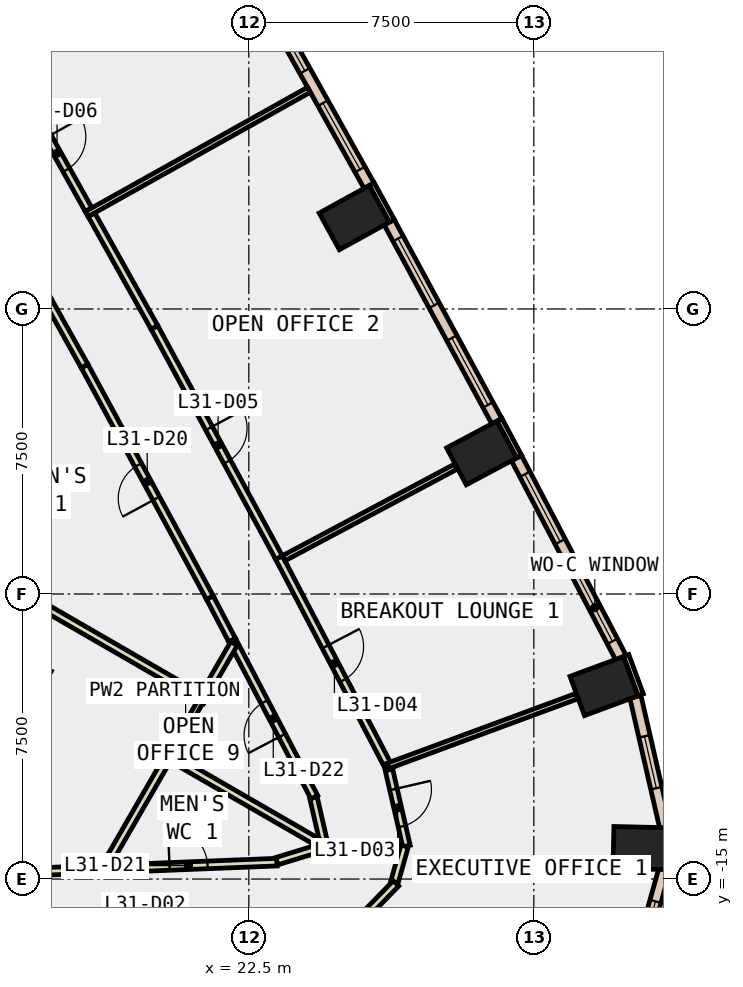
"""IFC4 building model, lengths in metres.
Left out: names, types, materials, properties, quantities, classifications, styles, units other than length and angle.
Written with IfcOpenShell. Run it as: python <this file> out.ifc"""

import sys

from ifc_helpers import new_model, si_unit, direction, frame, frame_2d, origin, origin_2d, place, context, subcontext, project, spatial, rectangle, extrude, element, fill, save


model = new_model("IFC4")
c1 = context("Model", 3, precision=1e-05, world=origin(), true_north=direction((0.0, 1.0)))
c2 = subcontext(c1, "Body", "Model", "MODEL_VIEW")
j1 = project(units=[si_unit("LENGTHUNIT", "METRE"), si_unit("PLANEANGLEUNIT", "RADIAN")], contexts=[c1])
p1 = place(None, origin())
s1 = spatial("IfcSite", under=j1, at=p1, CompositionType="ELEMENT")
p2 = place(p1, origin())
s2 = spatial("IfcBuilding", under=s1, at=p2, CompositionType="ELEMENT")
p3 = place(p2, frame((0.0, 0.0, 142.4)))
s3 = spatial("IfcBuildingStorey", under=s2, at=p3, CompositionType="ELEMENT", Elevation=142.4)
for number, where, z_axis, x_axis in (
    (1, (32.845, -14.185, -0.4), (0.0, 0.0, 1.0), (0.024, 1.0, 0.0)),
    (2, (31.846, -9.923, -0.4), (0.0, 0.0, 1.0), (-0.347, 0.938, 0.0)),
    (3, (28.626, -3.788, -0.4), (0.0, 0.0, 1.0), (-0.47, 0.883, 0.0)),
    (4, (25.275, 2.403, -0.4), (0.0, 0.0, 1.0), (-0.482, 0.876, 0.0)),
):
    element("IfcColumn", number, at=place(p3, frame(where, z_axis=z_axis, x_axis=x_axis)), inside=s3, PredefinedType="COLUMN", context=c2, shape_type="SweptSolid", body=[
        extrude(rectangle(XDim=1.1, YDim=1.5, at=origin_2d()), origin(), (0.0, 0.0, 1.0), 4.2),
    ])
for number, where, z_axis, x_axis in (
    (5, (32.81, -10.153, 0.0), (0.0, 0.0, 1.0), (-0.346, 0.938, 0.0)),
    (6, (29.612, -3.886, 0.0), (0.0, 0.0, 1.0), (-0.47, 0.883, 0.0)),
    (7, (26.263, 2.319, 0.0), (0.0, 0.0, 1.0), (-0.482, 0.876, 0.0)),
):
    element("IfcWall", number, at=place(p3, frame(where, z_axis=z_axis, x_axis=x_axis)), inside=s3, PredefinedType="STANDARD", context=c2, shape_type="SweptSolid", body=[
        extrude(rectangle(XDim=1.1, YDim=0.15, at=frame_2d((0.55, 0.0))), origin(), (0.0, 0.0, 1.0), 3.8),
    ])
p4 = place(p3, frame((32.587, -17.775, 0.0), z_axis=(0.0, 0.0, 1.0), x_axis=(0.270471130801, 0.962728085912, 0.0)))
e8 = element("IfcWall", 8, at=p4, inside=s3, PredefinedType="STANDARD", context=c2, shape_type="SweptSolid", body=[
    extrude(rectangle(XDim=3.143, YDim=0.3, at=frame_2d((1.572, 0.0))), origin(), (0.0, 0.0, 1.0), 3.8),
])
p5 = place(p4, frame((0.872, 0.0, 0.9)))
e9 = element("IfcOpeningElement", 9, at=p5, cuts=e8, PredefinedType="OPENING", context=c2, shape_type="SweptSolid", body=[
    extrude(rectangle(XDim=1.4, YDim=2.6, at=frame_2d((0.7, 1.3))), frame((0.0, 0.16, 0.0), z_axis=(0.0, -1.0, 0.0), x_axis=(1.0, 0.0, 0.0)), (0.0, 0.0, 1.0), 0.32),
])
p6 = place(p3, frame((33.463, -13.651, 0.0), z_axis=(0.0, 0.0, 1.0), x_axis=(-0.223538714932, 0.974695051247, 0.0)))
e10 = element("IfcWall", 10, at=p6, inside=s3, PredefinedType="STANDARD", context=c2, shape_type="SweptSolid", body=[
    extrude(rectangle(XDim=3.538, YDim=0.3, at=frame_2d((1.769, 0.0))), origin(), (0.0, 0.0, 1.0), 3.8),
])
p7 = place(p6, frame((1.069, 0.0, 0.9)))
e11 = element("IfcOpeningElement", 11, at=p7, cuts=e10, PredefinedType="OPENING", context=c2, shape_type="SweptSolid", body=[
    extrude(rectangle(XDim=1.4, YDim=2.6, at=frame_2d((0.7, 1.3))), frame((0.0, 0.16, 0.0), z_axis=(0.0, -1.0, 0.0), x_axis=(1.0, 0.0, 0.0)), (0.0, 0.0, 1.0), 0.32),
])
p8 = place(p3, frame((32.291, -9.173, 0.0), z_axis=(0.0, 0.0, 1.0), x_axis=(-0.463809970306, 0.885934710599, 0.0)))
e12 = element("IfcWall", 12, at=p8, inside=s3, PredefinedType="STANDARD", context=c2, shape_type="SweptSolid", body=[
    extrude(rectangle(XDim=5.927, YDim=0.3, at=frame_2d((2.963, 0.0))), origin(), (0.0, 0.0, 1.0), 3.8),
])
p9 = place(p8, frame((0.482, 0.0, 0.9)))
e13 = element("IfcOpeningElement", 13, at=p9, cuts=e12, PredefinedType="OPENING", context=c2, shape_type="SweptSolid", body=[
    extrude(rectangle(XDim=2.0, YDim=2.6, at=frame_2d((1.0, 1.3))), frame((0.0, 0.16, 0.0), z_axis=(0.0, -1.0, 0.0), x_axis=(1.0, 0.0, 0.0)), (0.0, 0.0, 1.0), 0.32),
])
p10 = place(p8, frame((3.445, 0.0, 0.9)))
e14 = element("IfcOpeningElement", 14, at=p10, cuts=e12, PredefinedType="OPENING", context=c2, shape_type="SweptSolid", body=[
    extrude(rectangle(XDim=2.0, YDim=2.6, at=frame_2d((1.0, 1.3))), frame((0.0, 0.16, 0.0), z_axis=(0.0, -1.0, 0.0), x_axis=(1.0, 0.0, 0.0)), (0.0, 0.0, 1.0), 0.32),
])
p11 = place(p3, frame((29.026, -2.953, 0.0), z_axis=(0.0, 0.0, 1.0), x_axis=(-0.475794135288, 0.87955667289, 0.0)))
e15 = element("IfcWall", 15, at=p11, inside=s3, PredefinedType="STANDARD", context=c2, shape_type="SweptSolid", body=[
    extrude(rectangle(XDim=5.952, YDim=0.3, at=frame_2d((2.976, 0.0))), origin(), (0.0, 0.0, 1.0), 3.8),
])
p12 = place(p11, frame((0.488, 0.0, 0.9)))
e16 = element("IfcOpeningElement", 16, at=p12, cuts=e15, PredefinedType="OPENING", context=c2, shape_type="SweptSolid", body=[
    extrude(rectangle(XDim=2.0, YDim=2.6, at=frame_2d((1.0, 1.3))), frame((0.0, 0.16, 0.0), z_axis=(0.0, -1.0, 0.0), x_axis=(1.0, 0.0, 0.0)), (0.0, 0.0, 1.0), 0.32),
])
p13 = place(p11, frame((3.464, 0.0, 0.9)))
e17 = element("IfcOpeningElement", 17, at=p13, cuts=e15, PredefinedType="OPENING", context=c2, shape_type="SweptSolid", body=[
    extrude(rectangle(XDim=2.0, YDim=2.6, at=frame_2d((1.0, 1.3))), frame((0.0, 0.16, 0.0), z_axis=(0.0, -1.0, 0.0), x_axis=(1.0, 0.0, 0.0)), (0.0, 0.0, 1.0), 0.32),
])
p14 = place(p3, frame((25.665, 3.244, 0.0), z_axis=(0.0, 0.0, 1.0), x_axis=(-0.488009846284, 0.872838123555, 0.0)))
e18 = element("IfcWall", 18, at=p14, inside=s3, PredefinedType="STANDARD", context=c2, shape_type="SweptSolid", body=[
    extrude(rectangle(XDim=5.951, YDim=0.3, at=frame_2d((2.976, 0.0))), origin(), (0.0, 0.0, 1.0), 3.8),
])
p15 = place(p14, frame((0.488, 0.0, 0.9)))
e19 = element("IfcOpeningElement", 19, at=p15, cuts=e18, PredefinedType="OPENING", context=c2, shape_type="SweptSolid", body=[
    extrude(rectangle(XDim=2.0, YDim=2.6, at=frame_2d((1.0, 1.3))), frame((0.0, 0.16, 0.0), z_axis=(0.0, -1.0, 0.0), x_axis=(1.0, 0.0, 0.0)), (0.0, 0.0, 1.0), 0.32),
])
p16 = place(p14, frame((3.463, 0.0, 0.9)))
e20 = element("IfcOpeningElement", 20, at=p16, cuts=e18, PredefinedType="OPENING", context=c2, shape_type="SweptSolid", body=[
    extrude(rectangle(XDim=2.0, YDim=2.6, at=frame_2d((1.0, 1.3))), frame((0.0, 0.16, 0.0), z_axis=(0.0, -1.0, 0.0), x_axis=(1.0, 0.0, 0.0)), (0.0, 0.0, 1.0), 0.32),
])
p17 = place(p3, frame((15.948, -14.846, 0.0), z_axis=(0.0, 0.0, 1.0), x_axis=(0.999208477774, 0.039779617206, 0.0)))
e21 = element("IfcWall", 21, at=p17, inside=s3, PredefinedType="PARTITIONING", context=c2, shape_type="SweptSolid", body=[
    extrude(rectangle(XDim=2.639, YDim=0.2, at=frame_2d((1.32, 0.0))), origin(), (0.0, 0.0, 1.0), 3.8),
])
p18 = place(p3, frame((22.063, -8.717, 0.0), z_axis=(0.0, 0.0, 1.0), x_axis=(-0.463776683525, 0.885952136302, 0.0)))
e22 = element("IfcWall", 22, at=p18, inside=s3, PredefinedType="PARTITIONING", context=c2, shape_type="SweptSolid", body=[
    extrude(rectangle(XDim=1.268, YDim=0.2, at=frame_2d((0.634, 0.0))), origin(), (0.0, 0.0, 1.0), 3.8),
])
p19 = place(p3, frame((21.475, -7.594, 0.0), z_axis=(0.0, 0.0, 1.0), x_axis=(-0.475918691018, 0.879489283357, 0.0)))
e23 = element("IfcWall", 23, at=p19, inside=s3, PredefinedType="PARTITIONING", context=c2, shape_type="SweptSolid", body=[
    extrude(rectangle(XDim=6.928, YDim=0.2, at=frame_2d((3.464, 0.0))), origin(), (0.0, 0.0, 1.0), 3.8),
])
p20 = place(p19, frame((2.964, 0.0, 0.0)))
e24 = element("IfcOpeningElement", 24, at=p20, cuts=e23, PredefinedType="OPENING", context=c2, shape_type="SweptSolid", body=[
    extrude(rectangle(XDim=1.0, YDim=2.1, at=frame_2d((0.5, 1.05))), frame((0.0, 0.11, 0.0), z_axis=(0.0, -1.0, 0.0), x_axis=(1.0, 0.0, 0.0)), (0.0, 0.0, 1.0), 0.22),
])
p21 = place(p3, frame((18.178, -1.501, 0.0), z_axis=(0.0, 0.0, 1.0), x_axis=(-0.487980809747, 0.872854357449, 0.0)))
e25 = element("IfcWall", 25, at=p21, inside=s3, PredefinedType="PARTITIONING", context=c2, shape_type="SweptSolid", body=[
    extrude(rectangle(XDim=2.162, YDim=0.2, at=frame_2d((1.081, 0.0))), origin(), (0.0, 0.0, 1.0), 3.8),
])
p22 = place(p3, frame((18.585, -14.741, 0.0), z_axis=(0.0, 0.0, 1.0), x_axis=(0.99920304932, 0.039915739113, 0.0)))
e26 = element("IfcWall", 26, at=p22, inside=s3, PredefinedType="PARTITIONING", context=c2, shape_type="SweptSolid", body=[
    extrude(rectangle(XDim=4.661, YDim=0.2, at=frame_2d((2.33, 0.0))), origin(), (0.0, 0.0, 1.0), 3.8),
])
p23 = place(p22, frame((1.83, 0.0, 0.0)))
e27 = element("IfcOpeningElement", 27, at=p23, cuts=e26, PredefinedType="OPENING", context=c2, shape_type="SweptSolid", body=[
    extrude(rectangle(XDim=1.0, YDim=2.1, at=frame_2d((0.5, 1.05))), frame((0.0, 0.11, 0.0), z_axis=(0.0, -1.0, 0.0), x_axis=(1.0, 0.0, 0.0)), (0.0, 0.0, 1.0), 0.22),
])
p24 = place(p3, frame((23.238, -14.529, 0.0), z_axis=(0.0, 0.0, 1.0), x_axis=(0.956086269468, 0.293085389152, 0.0)))
e28 = element("IfcWall", 28, at=p24, inside=s3, PredefinedType="PARTITIONING", context=c2, shape_type="SweptSolid", body=[
    extrude(rectangle(XDim=1.252, YDim=0.2, at=frame_2d((0.626, 0.0))), origin(), (0.0, 0.0, 1.0), 3.8),
])
p25 = place(p3, frame((24.482, -14.081, 0.0), z_axis=(0.0, 0.0, 1.0), x_axis=(-0.223967203961, 0.974596681479, 0.0)))
e29 = element("IfcWall", 29, at=p25, inside=s3, PredefinedType="PARTITIONING", context=c2, shape_type="SweptSolid", body=[
    extrude(rectangle(XDim=1.259, YDim=0.2, at=frame_2d((0.629, 0.0))), origin(), (0.0, 0.0, 1.0), 3.8),
])
p26 = place(p3, frame((24.224, -12.845, 0.0), z_axis=(0.0, 0.0, 1.0), x_axis=(-0.463819025987, 0.885929969655, 0.0)))
e30 = element("IfcWall", 30, at=p26, inside=s3, PredefinedType="PARTITIONING", context=c2, shape_type="SweptSolid", body=[
    extrude(rectangle(XDim=4.659, YDim=0.2, at=frame_2d((2.33, 0.0))), origin(), (0.0, 0.0, 1.0), 3.8),
])
p27 = place(p26, frame((1.83, 0.0, 0.0)))
e31 = element("IfcOpeningElement", 31, at=p27, cuts=e30, PredefinedType="OPENING", context=c2, shape_type="SweptSolid", body=[
    extrude(rectangle(XDim=1.0, YDim=2.1, at=frame_2d((0.5, 1.05))), frame((0.0, 0.11, 0.0), z_axis=(0.0, -1.0, 0.0), x_axis=(1.0, 0.0, 0.0)), (0.0, 0.0, 1.0), 0.22),
])
p28 = place(p3, frame((26.186, -12.12, 0.0), z_axis=(0.0, 0.0, 1.0), x_axis=(0.224108401048, -0.974564222912, 0.0)))
e32 = element("IfcWall", 32, at=p28, inside=s3, PredefinedType="PARTITIONING", context=c2, shape_type="SweptSolid", body=[
    extrude(rectangle(XDim=2.065, YDim=0.2, at=frame_2d((1.033, 0.0))), origin(), (0.0, 0.0, 1.0), 3.8),
])
p29 = place(p28, frame((0.533, 0.0, 0.0)))
e33 = element("IfcOpeningElement", 33, at=p29, cuts=e32, PredefinedType="OPENING", context=c2, shape_type="SweptSolid", body=[
    extrude(rectangle(XDim=1.0, YDim=2.1, at=frame_2d((0.5, 1.05))), frame((0.0, 0.11, 0.0), z_axis=(0.0, -1.0, 0.0), x_axis=(1.0, 0.0, 0.0)), (0.0, 0.0, 1.0), 0.22),
])
p30 = place(p3, frame((26.599, -14.132, 0.0), z_axis=(0.0, 0.0, 1.0), x_axis=(-0.270631784819, -0.962682936925, 0.0)))
e34 = element("IfcWall", 34, at=p30, inside=s3, PredefinedType="PARTITIONING", context=c2, shape_type="SweptSolid", body=[
    extrude(rectangle(XDim=0.994, YDim=0.2, at=frame_2d((0.497, 0.0))), origin(), (0.0, 0.0, 1.0), 3.8),
])
p31 = place(p3, frame((26.373, -15.114, 0.0), z_axis=(0.0, 0.0, 1.0), x_axis=(-0.698272822523, -0.715831729756, 0.0)))
e35 = element("IfcWall", 35, at=p31, inside=s3, PredefinedType="PARTITIONING", context=c2, shape_type="SweptSolid", body=[
    extrude(rectangle(XDim=1.196, YDim=0.2, at=frame_2d((0.598, 0.0))), origin(), (0.0, 0.0, 1.0), 3.8),
])
p32 = place(p3, frame((23.294, -6.541, 0.0), z_axis=(0.0, 0.0, 1.0), x_axis=(0.463802391881, -0.885938678062, 0.0)))
e36 = element("IfcWall", 36, at=p32, inside=s3, PredefinedType="PARTITIONING", context=c2, shape_type="SweptSolid", body=[
    extrude(rectangle(XDim=6.287, YDim=0.2, at=frame_2d((3.144, 0.0))), origin(), (0.0, 0.0, 1.0), 3.8),
])
p33 = place(p32, frame((2.644, 0.0, 0.0)))
e37 = element("IfcOpeningElement", 37, at=p33, cuts=e36, PredefinedType="OPENING", context=c2, shape_type="SweptSolid", body=[
    extrude(rectangle(XDim=1.0, YDim=2.1, at=frame_2d((0.5, 1.05))), frame((0.0, 0.11, 0.0), z_axis=(0.0, -1.0, 0.0), x_axis=(1.0, 0.0, 0.0)), (0.0, 0.0, 1.0), 0.22),
])
p34 = place(p3, frame((18.358, 2.481, 0.0), z_axis=(0.0, 0.0, 1.0), x_axis=(0.48792588674, -0.872885060617, 0.0)))
e38 = element("IfcWall", 38, at=p34, inside=s3, PredefinedType="PARTITIONING", context=c2, shape_type="SweptSolid", body=[
    extrude(rectangle(XDim=3.403, YDim=0.2, at=frame_2d((1.701, 0.0))), origin(), (0.0, 0.0, 1.0), 3.8),
])
p35 = place(p3, frame((20.018, -0.489, 0.0), z_axis=(0.0, 0.0, 1.0), x_axis=(0.476025981828, -0.87943121654, 0.0)))
e39 = element("IfcWall", 39, at=p35, inside=s3, PredefinedType="PARTITIONING", context=c2, shape_type="SweptSolid", body=[
    extrude(rectangle(XDim=6.882, YDim=0.2, at=frame_2d((3.441, 0.0))), origin(), (0.0, 0.0, 1.0), 3.8),
])
p36 = place(p35, frame((3.016, 0.0, 0.0)))
e40 = element("IfcOpeningElement", 40, at=p36, cuts=e39, PredefinedType="OPENING", context=c2, shape_type="SweptSolid", body=[
    extrude(rectangle(XDim=1.0, YDim=2.1, at=frame_2d((0.5, 1.05))), frame((0.0, 0.11, 0.0), z_axis=(0.0, -1.0, 0.0), x_axis=(1.0, 0.0, 0.0)), (0.0, 0.0, 1.0), 0.22),
])
p37 = place(p3, frame((16.624, 5.582, 0.0), z_axis=(0.0, 0.0, 1.0), x_axis=(0.487871212611, -0.872915620152, 0.0)))
e41 = element("IfcWall", 41, at=p37, inside=s3, PredefinedType="PARTITIONING", context=c2, shape_type="SweptSolid", body=[
    extrude(rectangle(XDim=3.402, YDim=0.2, at=frame_2d((1.701, 0.0))), origin(), (0.0, 0.0, 1.0), 3.8),
])
p38 = place(p37, frame((1.202, 0.0, 0.0)))
e42 = element("IfcOpeningElement", 42, at=p38, cuts=e41, PredefinedType="OPENING", context=c2, shape_type="SweptSolid", body=[
    extrude(rectangle(XDim=1.0, YDim=2.1, at=frame_2d((0.5, 1.05))), frame((0.0, 0.11, 0.0), z_axis=(0.0, -1.0, 0.0), x_axis=(1.0, 0.0, 0.0)), (0.0, 0.0, 1.0), 0.22),
])
p39 = place(p3, frame((13.485, -5.744, 0.0), z_axis=(0.0, 0.0, 1.0), x_axis=(0.865950545648, -0.500129635687, 0.0)))
e43 = element("IfcWall", 43, at=p39, inside=s3, PredefinedType="PARTITIONING", context=c2, shape_type="SweptSolid", body=[
    extrude(rectangle(XDim=9.1, YDim=0.2, at=frame_2d((4.55, 0.0))), origin(), (0.0, 0.0, 1.0), 3.8),
])
p40 = place(p3, frame((20.347, -11.858, 0.0), z_axis=(0.0, 0.0, 1.0), x_axis=(-0.49990681678, -0.866079196458, 0.0)))
e44 = element("IfcWall", 44, at=p40, inside=s3, PredefinedType="PARTITIONING", context=c2, shape_type="SweptSolid", body=[
    extrude(rectangle(XDim=3.324, YDim=0.2, at=frame_2d((1.662, 0.0))), origin(), (0.0, 0.0, 1.0), 3.8),
])
p41 = place(p3, frame((21.228, -10.331, 0.0), z_axis=(0.0, 0.0, 1.0), x_axis=(-0.499920861661, -0.866071089505, 0.0)))
e45 = element("IfcWall", 45, at=p41, inside=s3, PredefinedType="PARTITIONING", context=c2, shape_type="SweptSolid", body=[
    extrude(rectangle(XDim=1.562, YDim=0.15, at=frame_2d((0.781, 0.0))), origin(), (0.0, 0.0, 1.0), 3.8),
])
p42 = place(p3, frame((22.109, -8.805, 0.0), z_axis=(0.0, 0.0, 1.0), x_axis=(-0.499920861661, -0.866071089505, 0.0)))
e46 = element("IfcWall", 46, at=p42, inside=s3, PredefinedType="PARTITIONING", context=c2, shape_type="SweptSolid", body=[
    extrude(rectangle(XDim=1.562, YDim=0.2, at=frame_2d((0.781, 0.0))), origin(), (0.0, 0.0, 1.0), 3.8),
])
p43 = place(p3, frame((20.31, -11.721, 0.0), z_axis=(0.0, 0.0, 1.0), x_axis=(0.86603399059, -0.499985126921, 0.0)))
e47 = element("IfcWall", 47, at=p43, inside=s3, PredefinedType="PARTITIONING", context=c2, shape_type="SweptSolid", body=[
    extrude(rectangle(XDim=4.854, YDim=0.2, at=frame_2d((2.427, 0.0))), origin(), (0.0, 0.0, 1.0), 3.8),
])
p44 = place(p3, frame((26.164, -12.023, 0.0), z_axis=(0.0, 0.0, 1.0), x_axis=(0.937995804261, 0.346646608505, 0.0)))
e48 = element("IfcWall", 48, at=p44, inside=s3, PredefinedType="PARTITIONING", context=c2, shape_type="SweptSolid", body=[
    extrude(rectangle(XDim=5.288, YDim=0.15, at=frame_2d((2.644, 0.0))), origin(), (0.0, 0.0, 1.0), 3.8),
])
p45 = place(p3, frame((23.417, -6.56, 0.0), z_axis=(0.0, 0.0, 1.0), x_axis=(0.882784638588, 0.469777906967, 0.0)))
e49 = element("IfcWall", 49, at=p45, inside=s3, PredefinedType="PARTITIONING", context=c2, shape_type="SweptSolid", body=[
    extrude(rectangle(XDim=5.13, YDim=0.15, at=frame_2d((2.565, 0.0))), origin(), (0.0, 0.0, 1.0), 3.8),
])
p46 = place(p3, frame((18.234, 2.497, 0.0), z_axis=(0.0, 0.0, 1.0), x_axis=(0.872820235044, 0.4880418397, 0.0)))
e50 = element("IfcWall", 50, at=p46, inside=s3, PredefinedType="PARTITIONING", context=c2, shape_type="SweptSolid", body=[
    extrude(rectangle(XDim=6.7, YDim=0.15, at=frame_2d((3.35, 0.0))), origin(), (0.0, 0.0, 1.0), 3.8),
])
p47 = place(p5, origin())
e51 = element("IfcWindow", 51, at=p47, inside=s3, PartitioningType="SINGLE_PANEL", PredefinedType="WINDOW", context=c2, shape_type="SweptSolid", body=[
    extrude(rectangle(XDim=1.4, YDim=2.6, at=frame_2d((0.7, 1.3))), frame((0.0, 0.03, 0.0), z_axis=(0.0, -1.0, 0.0), x_axis=(1.0, 0.0, 0.0)), (0.0, 0.0, 1.0), 0.06),
])
fill(e9, e51)
p48 = place(p7, origin())
e52 = element("IfcWindow", 52, at=p48, inside=s3, PartitioningType="SINGLE_PANEL", PredefinedType="WINDOW", context=c2, shape_type="SweptSolid", body=[
    extrude(rectangle(XDim=1.4, YDim=2.6, at=frame_2d((0.7, 1.3))), frame((0.0, 0.03, 0.0), z_axis=(0.0, -1.0, 0.0), x_axis=(1.0, 0.0, 0.0)), (0.0, 0.0, 1.0), 0.06),
])
fill(e11, e52)
p49 = place(p9, origin())
e53 = element("IfcWindow", 53, at=p49, inside=s3, PartitioningType="SINGLE_PANEL", PredefinedType="WINDOW", context=c2, shape_type="SweptSolid", body=[
    extrude(rectangle(XDim=2.0, YDim=2.6, at=frame_2d((1.0, 1.3))), frame((0.0, 0.03, 0.0), z_axis=(0.0, -1.0, 0.0), x_axis=(1.0, 0.0, 0.0)), (0.0, 0.0, 1.0), 0.06),
])
fill(e13, e53)
p50 = place(p10, origin())
e54 = element("IfcWindow", 54, at=p50, inside=s3, PartitioningType="SINGLE_PANEL", PredefinedType="WINDOW", context=c2, shape_type="SweptSolid", body=[
    extrude(rectangle(XDim=2.0, YDim=2.6, at=frame_2d((1.0, 1.3))), frame((0.0, 0.03, 0.0), z_axis=(0.0, -1.0, 0.0), x_axis=(1.0, 0.0, 0.0)), (0.0, 0.0, 1.0), 0.06),
])
fill(e14, e54)
p51 = place(p12, origin())
e55 = element("IfcWindow", 55, at=p51, inside=s3, PartitioningType="SINGLE_PANEL", PredefinedType="WINDOW", context=c2, shape_type="SweptSolid", body=[
    extrude(rectangle(XDim=2.0, YDim=2.6, at=frame_2d((1.0, 1.3))), frame((0.0, 0.03, 0.0), z_axis=(0.0, -1.0, 0.0), x_axis=(1.0, 0.0, 0.0)), (0.0, 0.0, 1.0), 0.06),
])
fill(e16, e55)
p52 = place(p13, origin())
e56 = element("IfcWindow", 56, at=p52, inside=s3, PartitioningType="SINGLE_PANEL", PredefinedType="WINDOW", context=c2, shape_type="SweptSolid", body=[
    extrude(rectangle(XDim=2.0, YDim=2.6, at=frame_2d((1.0, 1.3))), frame((0.0, 0.03, 0.0), z_axis=(0.0, -1.0, 0.0), x_axis=(1.0, 0.0, 0.0)), (0.0, 0.0, 1.0), 0.06),
])
fill(e17, e56)
p53 = place(p15, origin())
e57 = element("IfcWindow", 57, at=p53, inside=s3, PartitioningType="SINGLE_PANEL", PredefinedType="WINDOW", context=c2, shape_type="SweptSolid", body=[
    extrude(rectangle(XDim=2.0, YDim=2.6, at=frame_2d((1.0, 1.3))), frame((0.0, 0.03, 0.0), z_axis=(0.0, -1.0, 0.0), x_axis=(1.0, 0.0, 0.0)), (0.0, 0.0, 1.0), 0.06),
])
fill(e19, e57)
p54 = place(p16, origin())
e58 = element("IfcWindow", 58, at=p54, inside=s3, PartitioningType="SINGLE_PANEL", PredefinedType="WINDOW", context=c2, shape_type="SweptSolid", body=[
    extrude(rectangle(XDim=2.0, YDim=2.6, at=frame_2d((1.0, 1.3))), frame((0.0, 0.03, 0.0), z_axis=(0.0, -1.0, 0.0), x_axis=(1.0, 0.0, 0.0)), (0.0, 0.0, 1.0), 0.06),
])
fill(e20, e58)
p55 = place(p29, origin())
e59 = element("IfcDoor", 59, at=p55, inside=s3, OperationType="SINGLE_SWING_LEFT", PredefinedType="DOOR", context=c2, shape_type="SweptSolid", body=[
    extrude(rectangle(XDim=1.0, YDim=2.1, at=frame_2d((0.5, 1.05))), frame((0.0, 0.025, 0.0), z_axis=(0.0, -1.0, 0.0), x_axis=(1.0, 0.0, 0.0)), (0.0, 0.0, 1.0), 0.05),
])
fill(e33, e59)
p56 = place(p33, origin())
e60 = element("IfcDoor", 60, at=p56, inside=s3, OperationType="SINGLE_SWING_LEFT", PredefinedType="DOOR", context=c2, shape_type="SweptSolid", body=[
    extrude(rectangle(XDim=1.0, YDim=2.1, at=frame_2d((0.5, 1.05))), frame((0.0, 0.025, 0.0), z_axis=(0.0, -1.0, 0.0), x_axis=(1.0, 0.0, 0.0)), (0.0, 0.0, 1.0), 0.05),
])
fill(e37, e60)
p57 = place(p36, origin())
e61 = element("IfcDoor", 61, at=p57, inside=s3, OperationType="SINGLE_SWING_LEFT", PredefinedType="DOOR", context=c2, shape_type="SweptSolid", body=[
    extrude(rectangle(XDim=1.0, YDim=2.1, at=frame_2d((0.5, 1.05))), frame((0.0, 0.025, 0.0), z_axis=(0.0, -1.0, 0.0), x_axis=(1.0, 0.0, 0.0)), (0.0, 0.0, 1.0), 0.05),
])
fill(e40, e61)
p58 = place(p38, origin())
e62 = element("IfcDoor", 62, at=p58, inside=s3, OperationType="SINGLE_SWING_LEFT", PredefinedType="DOOR", context=c2, shape_type="SweptSolid", body=[
    extrude(rectangle(XDim=1.0, YDim=2.1, at=frame_2d((0.5, 1.05))), frame((0.0, 0.025, 0.0), z_axis=(0.0, -1.0, 0.0), x_axis=(1.0, 0.0, 0.0)), (0.0, 0.0, 1.0), 0.05),
])
fill(e42, e62)
p59 = place(p20, origin())
e63 = element("IfcDoor", 63, at=p59, inside=s3, OperationType="SINGLE_SWING_LEFT", PredefinedType="DOOR", context=c2, shape_type="SweptSolid", body=[
    extrude(rectangle(XDim=1.0, YDim=2.1, at=frame_2d((0.5, 1.05))), frame((0.0, 0.025, 0.0), z_axis=(0.0, -1.0, 0.0), x_axis=(1.0, 0.0, 0.0)), (0.0, 0.0, 1.0), 0.05),
])
fill(e24, e63)
p60 = place(p23, origin())
e64 = element("IfcDoor", 64, at=p60, inside=s3, OperationType="SINGLE_SWING_LEFT", PredefinedType="DOOR", context=c2, shape_type="SweptSolid", body=[
    extrude(rectangle(XDim=1.0, YDim=2.1, at=frame_2d((0.5, 1.05))), frame((0.0, 0.025, 0.0), z_axis=(0.0, -1.0, 0.0), x_axis=(1.0, 0.0, 0.0)), (0.0, 0.0, 1.0), 0.05),
])
fill(e27, e64)
p61 = place(p27, origin())
e65 = element("IfcDoor", 65, at=p61, inside=s3, OperationType="SINGLE_SWING_LEFT", PredefinedType="DOOR", context=c2, shape_type="SweptSolid", body=[
    extrude(rectangle(XDim=1.0, YDim=2.1, at=frame_2d((0.5, 1.05))), frame((0.0, 0.025, 0.0), z_axis=(0.0, -1.0, 0.0), x_axis=(1.0, 0.0, 0.0)), (0.0, 0.0, 1.0), 0.05),
])
fill(e31, e65)
save(model, sys.argv[1])
